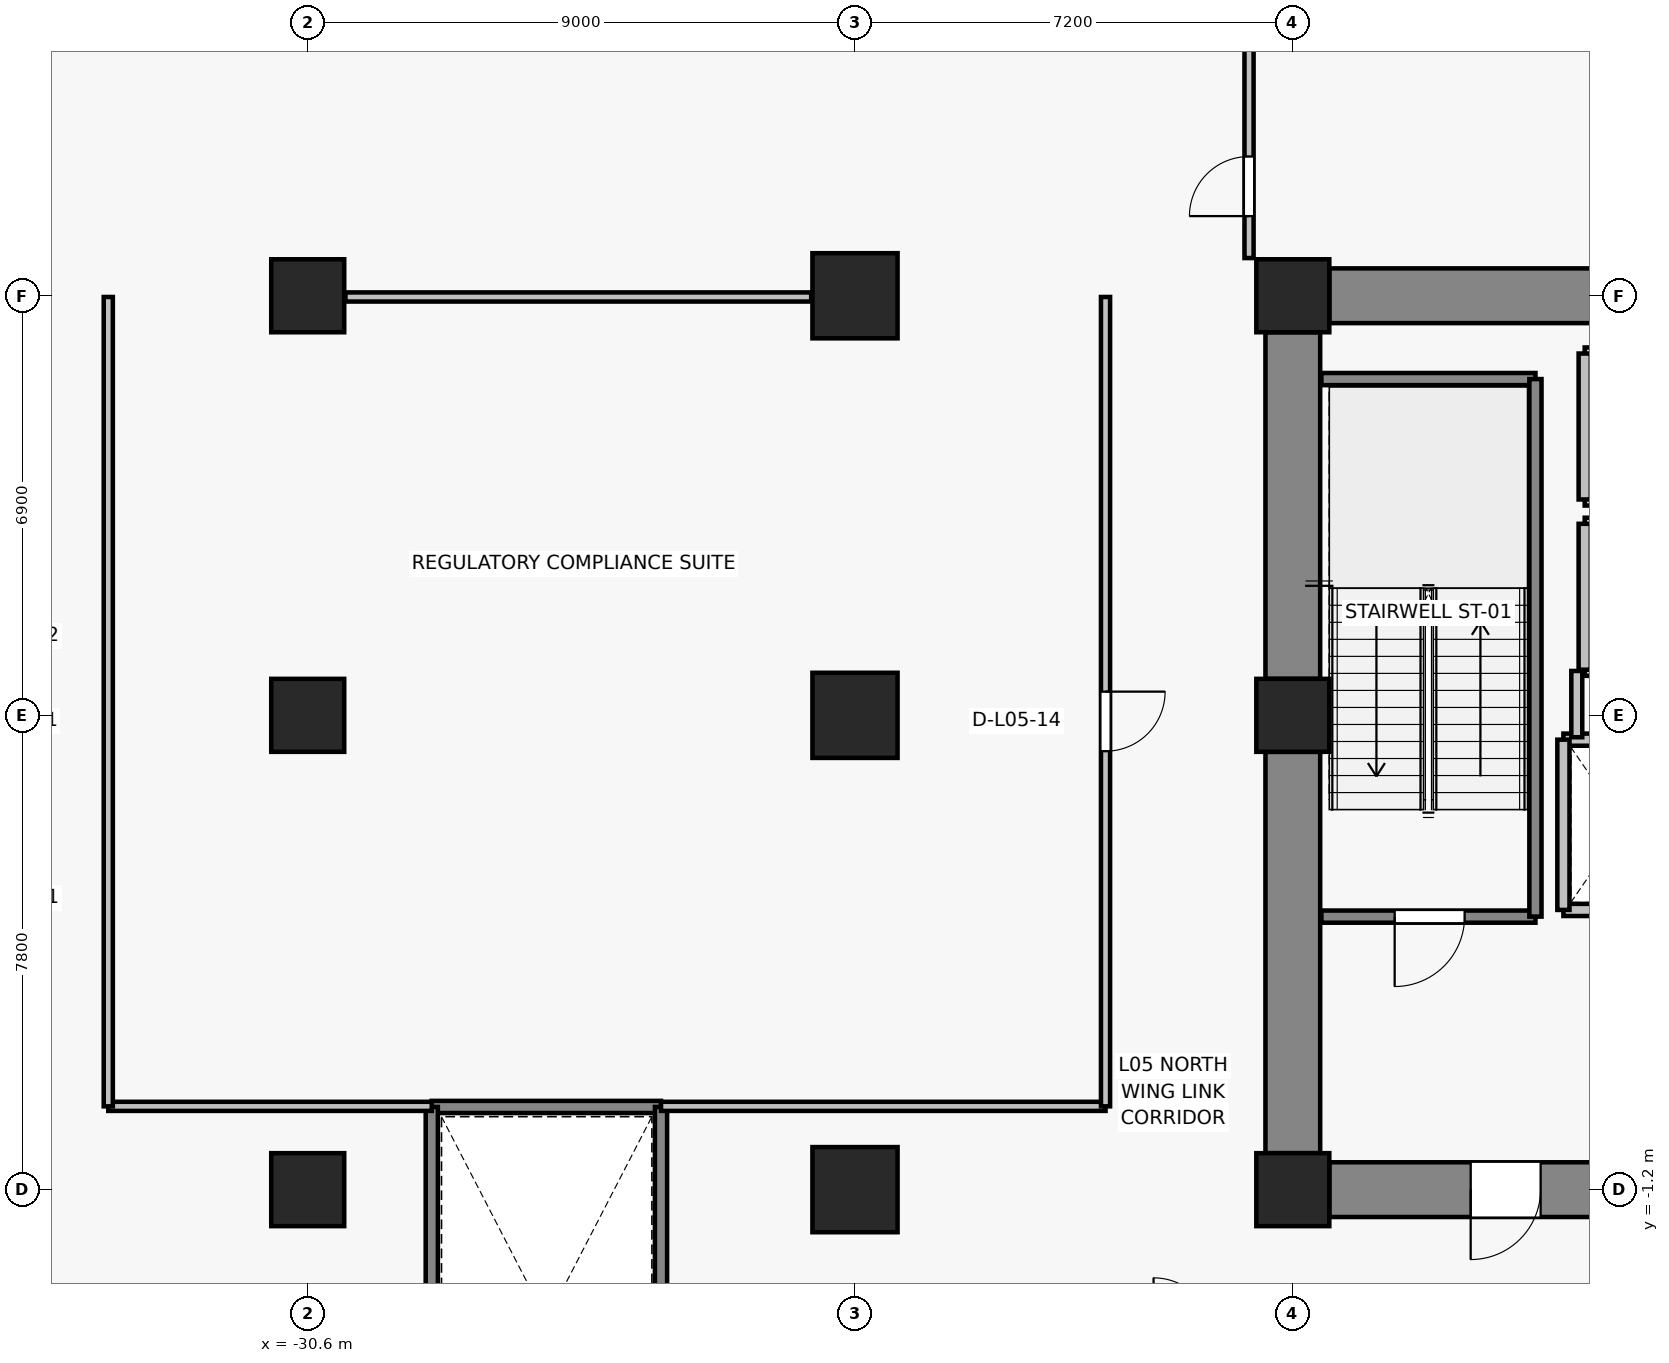
"""IFC4 building model, lengths in metres.
Left out: names, types, materials, properties, quantities, classifications, styles, units other than length and angle.
Written with IfcOpenShell. Run it as: python <this file> out.ifc"""

import sys

from ifc_helpers import new_model, si_unit, direction, frame, frame_2d, origin, origin_2d, place, context, subcontext, project, spatial, rectangle, extrude, source, transform, mapped, element, fill, save


model = new_model("IFC4")
c1 = context("Model", 3, precision=1e-05, world=origin(), true_north=direction((0.0, 1.0)))
c2 = subcontext(c1, "Body", "Model", "MODEL_VIEW")
j1 = project(units=[si_unit("LENGTHUNIT", "METRE"), si_unit("PLANEANGLEUNIT", "RADIAN")], contexts=[c1])
p1 = place(None, origin())
s1 = spatial("IfcSite", under=j1, at=p1, CompositionType="ELEMENT")
p2 = place(p1, origin())
s2 = spatial("IfcBuilding", under=s1, at=p2, CompositionType="ELEMENT")
p3 = place(p2, frame((0.0, 0.0, 22.6)))
s3 = spatial("IfcBuildingStorey", under=s2, at=p3, CompositionType="ELEMENT", Elevation=22.6)
for number, where, z_axis, x_axis in (
    (1, (-14.4, -1.2, 0.0), (0.0, 0.0, 1.0), (1.0, 0.0, 0.0)),
    (2, (-14.4, 6.6, 0.0), (0.0, 0.0, 1.0), (1.0, 0.0, 0.0)),
    (3, (-14.4, 13.5, 0.0), (0.0, 0.0, 1.0), (1.0, 0.0, 0.0)),
):
    element("IfcColumn", number, at=place(p3, frame(where, z_axis=z_axis, x_axis=x_axis)), inside=s3, PredefinedType="COLUMN", context=c2, shape_type="SweptSolid", body=[
        extrude(rectangle(XDim=1.2, YDim=1.2, at=origin_2d()), origin(), (0.0, 0.0, 1.0), 4.8),
    ])
for number, where, z_axis, x_axis in (
    (4, (-21.6, -1.2, 0.0), (0.0, 0.0, 1.0), (1.0, 0.0, 0.0)),
    (5, (-21.6, 6.6, 0.0), (0.0, 0.0, 1.0), (1.0, 0.0, 0.0)),
    (6, (-21.6, 13.5, 0.0), (0.0, 0.0, 1.0), (1.0, 0.0, 0.0)),
):
    element("IfcColumn", number, at=place(p3, frame(where, z_axis=z_axis, x_axis=x_axis)), inside=s3, PredefinedType="COLUMN", context=c2, shape_type="SweptSolid", body=[
        extrude(rectangle(XDim=1.4, YDim=1.4, at=origin_2d()), origin(), (0.0, 0.0, 1.0), 4.8),
    ])
for number, where, z_axis, x_axis in (
    (7, (-30.6, -1.2, 0.0), (0.0, 0.0, 1.0), (1.0, 0.0, 0.0)),
    (8, (-30.6, 6.6, 0.0), (0.0, 0.0, 1.0), (1.0, 0.0, 0.0)),
    (9, (-30.6, 13.5, 0.0), (0.0, 0.0, 1.0), (1.0, 0.0, 0.0)),
):
    element("IfcColumn", number, at=place(p3, frame(where, z_axis=z_axis, x_axis=x_axis)), inside=s3, PredefinedType="COLUMN", context=c2, shape_type="SweptSolid", body=[
        extrude(rectangle(XDim=1.2, YDim=1.2, at=origin_2d()), origin(), (0.0, 0.0, 1.0), 4.8),
    ])
p4 = place(p3, frame((-13.8, 13.5, 0.0), z_axis=(0.0, 0.0, 1.0), x_axis=(1.0, 0.0, 0.0)))
e10 = element("IfcWall", 10, at=p4, inside=s3, PredefinedType="SHEAR", context=c2, shape_type="SweptSolid", body=[
    extrude(rectangle(XDim=6.0, YDim=0.9, at=frame_2d((3.0, 0.0))), origin(), (0.0, 0.0, 1.0), 4.55),
])
p5 = place(p3, frame((-14.4, -0.6, 0.0), z_axis=(0.0, 0.0, 1.0), x_axis=(0.0, 1.0, 0.0)))
e11 = element("IfcWall", 11, at=p5, inside=s3, PredefinedType="SHEAR", context=c2, shape_type="SweptSolid", body=[
    extrude(rectangle(XDim=6.6, YDim=0.9, at=frame_2d((3.3, 0.0))), origin(), (0.0, 0.0, 1.0), 4.55),
])
p6 = place(p3, frame((-14.4, 7.2, 0.0), z_axis=(0.0, 0.0, 1.0), x_axis=(0.0, 1.0, 0.0)))
e12 = element("IfcWall", 12, at=p6, inside=s3, PredefinedType="SHEAR", context=c2, shape_type="SweptSolid", body=[
    extrude(rectangle(XDim=5.7, YDim=0.9, at=frame_2d((2.85, 0.0))), origin(), (0.0, 0.0, 1.0), 4.55),
])
p7 = place(p3, frame((-7.8, -1.2, 0.0), z_axis=(0.0, 0.0, 1.0), x_axis=(-1.0, 0.0, 0.0)))
e13 = element("IfcWall", 13, at=p7, inside=s3, PredefinedType="SHEAR", context=c2, shape_type="SweptSolid", body=[
    extrude(rectangle(XDim=6.0, YDim=0.9, at=frame_2d((3.0, 0.0))), origin(), (0.0, 0.0, 1.0), 4.55),
])
p8 = place(p7, frame((2.525, 0.0, 0.0)))
e14 = element("IfcOpeningElement", 14, at=p8, cuts=e13, PredefinedType="OPENING", context=c2, shape_type="SweptSolid", body=[
    extrude(rectangle(XDim=1.15, YDim=2.15, at=frame_2d((0.575, 1.075))), frame((0.0, 0.46, 0.0), z_axis=(0.0, -1.0, 0.0), x_axis=(1.0, 0.0, 0.0)), (0.0, 0.0, 1.0), 0.92),
])
p9 = place(p3, frame((-7.95, 3.4, 0.0), z_axis=(0.0, 0.0, 1.0), x_axis=(-1.0, 0.0, 0.0)))
e15 = element("IfcWall", 15, at=p9, inside=s3, PredefinedType="SOLIDWALL", context=c2, shape_type="SweptSolid", body=[
    extrude(rectangle(XDim=2.0, YDim=0.2, at=frame_2d((1.0, 0.0))), origin(), (0.0, 0.0, 1.0), 4.55),
])
p10 = place(p9, frame((0.45, 0.0, 0.0)))
e16 = element("IfcOpeningElement", 16, at=p10, cuts=e15, PredefinedType="OPENING", context=c2, shape_type="SweptSolid", body=[
    extrude(rectangle(XDim=1.1, YDim=2.2, at=frame_2d((0.55, 1.1))), frame((0.0, 0.11, 0.0), z_axis=(0.0, -1.0, 0.0), x_axis=(1.0, 0.0, 0.0)), (0.0, 0.0, 1.0), 0.22),
])
p11 = place(p3, frame((-9.95, 6.2, 0.0), z_axis=(0.0, 0.0, 1.0), x_axis=(1.0, 0.0, 0.0)))
e17 = element("IfcWall", 17, at=p11, inside=s3, PredefinedType="SOLIDWALL", context=c2, shape_type="SweptSolid", body=[
    extrude(rectangle(XDim=2.0, YDim=0.2, at=frame_2d((1.0, 0.0))), origin(), (0.0, 0.0, 1.0), 4.55),
])
p12 = place(p3, frame((-9.95, 3.4, 0.0), z_axis=(0.0, 0.0, 1.0), x_axis=(0.0, 1.0, 0.0)))
e18 = element("IfcWall", 18, at=p12, inside=s3, PredefinedType="SOLIDWALL", context=c2, shape_type="SweptSolid", body=[
    extrude(rectangle(XDim=2.8, YDim=0.2, at=frame_2d((1.4, 0.0))), origin(), (0.0, 0.0, 1.0), 4.55),
])
for number, where, z_axis, x_axis in (
    (19, (-7.4, 7.35, 0.0), (0.0, 0.0, 1.0), (-1.0, 0.0, 0.0)),
    (20, (-9.6, 9.75, 0.0), (0.0, 0.0, 1.0), (1.0, 0.0, 0.0)),
):
    element("IfcWall", number, at=place(p3, frame(where, z_axis=z_axis, x_axis=x_axis)), inside=s3, PredefinedType="SOLIDWALL", context=c2, shape_type="SweptSolid", body=[
        extrude(rectangle(XDim=2.2, YDim=0.2, at=frame_2d((1.1, 0.0))), origin(), (0.0, 0.0, 1.0), 3.09),
    ])
p13 = place(p3, frame((-9.6, 7.35, 0.0), z_axis=(0.0, 0.0, 1.0), x_axis=(0.0, 1.0, 0.0)))
e21 = element("IfcWall", 21, at=p13, inside=s3, PredefinedType="SOLIDWALL", context=c2, shape_type="SweptSolid", body=[
    extrude(rectangle(XDim=2.4, YDim=0.2, at=frame_2d((1.2, 0.0))), origin(), (0.0, 0.0, 1.0), 4.55),
])
for number, where, z_axis, x_axis in (
    (22, (-7.4, 10.15, 0.0), (0.0, 0.0, 1.0), (-1.0, 0.0, 0.0)),
    (23, (-9.6, 12.55, 0.0), (0.0, 0.0, 1.0), (1.0, 0.0, 0.0)),
):
    element("IfcWall", number, at=place(p3, frame(where, z_axis=z_axis, x_axis=x_axis)), inside=s3, PredefinedType="SOLIDWALL", context=c2, shape_type="SweptSolid", body=[
        extrude(rectangle(XDim=2.2, YDim=0.2, at=frame_2d((1.1, 0.0))), origin(), (0.0, 0.0, 1.0), 3.09),
    ])
p14 = place(p3, frame((-9.6, 10.15, 0.0), z_axis=(0.0, 0.0, 1.0), x_axis=(0.0, 1.0, 0.0)))
e24 = element("IfcWall", 24, at=p14, inside=s3, PredefinedType="SOLIDWALL", context=c2, shape_type="SweptSolid", body=[
    extrude(rectangle(XDim=2.4, YDim=0.2, at=frame_2d((1.2, 0.0))), origin(), (0.0, 0.0, 1.0), 4.55),
])
p15 = place(p3, frame((-10.41, 3.29, 0.0), z_axis=(0.0, 0.0, 1.0), x_axis=(-1.0, 0.0, 0.0)))
e25 = element("IfcWall", 25, at=p15, inside=s3, PredefinedType="SOLIDWALL", context=c2, shape_type="SweptSolid", body=[
    extrude(rectangle(XDim=3.52, YDim=0.2, at=frame_2d((1.76, 0.0))), origin(), (0.0, 0.0, 1.0), 4.55),
])
p16 = place(p15, frame((1.165, 0.0, 0.0)))
e26 = element("IfcOpeningElement", 26, at=p16, cuts=e25, PredefinedType="OPENING", context=c2, shape_type="SweptSolid", body=[
    extrude(rectangle(XDim=1.15, YDim=2.15, at=frame_2d((0.575, 1.075))), frame((0.0, 0.11, 0.0), z_axis=(0.0, -1.0, 0.0), x_axis=(1.0, 0.0, 0.0)), (0.0, 0.0, 1.0), 0.22),
])
p17 = place(p3, frame((-13.93, 12.13, 0.0), z_axis=(0.0, 0.0, 1.0), x_axis=(1.0, 0.0, 0.0)))
e27 = element("IfcWall", 27, at=p17, inside=s3, PredefinedType="SOLIDWALL", context=c2, shape_type="SweptSolid", body=[
    extrude(rectangle(XDim=3.52, YDim=0.2, at=frame_2d((1.76, 0.0))), origin(), (0.0, 0.0, 1.0), 4.55),
])
p18 = place(p3, frame((-10.41, 12.13, 0.0), z_axis=(0.0, 0.0, 1.0), x_axis=(0.0, -1.0, 0.0)))
e28 = element("IfcWall", 28, at=p18, inside=s3, PredefinedType="SOLIDWALL", context=c2, shape_type="SweptSolid", body=[
    extrude(rectangle(XDim=8.84, YDim=0.2, at=frame_2d((4.42, 0.0))), origin(), (0.0, 0.0, 1.0), 4.55),
])
p19 = place(p3, frame((-9.73, 6.24, 0.0), z_axis=(0.0, 0.0, 1.0), x_axis=(0.0, 1.0, 0.0)))
e29 = element("IfcWall", 29, at=p19, inside=s3, PredefinedType="PARTITIONING", context=c2, shape_type="SweptSolid", body=[
    extrude(rectangle(XDim=1.09, YDim=0.18, at=frame_2d((0.545, 0.0))), origin(), (0.0, 0.0, 1.0), 4.55),
])
p20 = place(p3, frame((-28.56, 0.16, 0.0), z_axis=(0.0, 0.0, 1.0), x_axis=(1.0, 0.0, 0.0)))
e30 = element("IfcWall", 30, at=p20, inside=s3, PredefinedType="SOLIDWALL", context=c2, shape_type="SweptSolid", body=[
    extrude(rectangle(XDim=3.77, YDim=0.2, at=frame_2d((1.885, 0.0))), origin(), (0.0, 0.0, 1.0), 4.55),
])
for number, where, z_axis, x_axis in (
    (31, (-28.56, -8.76, 0.0), (0.0, 0.0, 1.0), (0.0, 1.0, 0.0)),
    (32, (-24.79, 0.16, 0.0), (0.0, 0.0, 1.0), (0.0, -1.0, 0.0)),
):
    element("IfcWall", number, at=place(p3, frame(where, z_axis=z_axis, x_axis=x_axis)), inside=s3, PredefinedType="SOLIDWALL", context=c2, shape_type="SweptSolid", body=[
        extrude(rectangle(XDim=8.92, YDim=0.2, at=frame_2d((4.46, 0.0))), origin(), (0.0, 0.0, 1.0), 3.09),
    ])
p21 = place(p3, frame((-28.56, 0.17, 0.0), z_axis=(0.0, 0.0, 1.0), x_axis=(-1.0, 0.0, 0.0)))
e33 = element("IfcWall", 33, at=p21, inside=s3, PredefinedType="PARTITIONING", context=c2, shape_type="SweptSolid", body=[
    extrude(rectangle(XDim=5.32, YDim=0.15, at=frame_2d((2.66, 0.0))), origin(), (0.0, 0.0, 1.0), 3.09),
])
p22 = place(p3, frame((-17.48, 0.17, 0.0), z_axis=(0.0, 0.0, 1.0), x_axis=(-1.0, 0.0, 0.0)))
e34 = element("IfcWall", 34, at=p22, inside=s3, PredefinedType="PARTITIONING", context=c2, shape_type="SweptSolid", body=[
    extrude(rectangle(XDim=7.31, YDim=0.15, at=frame_2d((3.655, 0.0))), origin(), (0.0, 0.0, 1.0), 3.94),
])
p23 = place(p3, frame((-29.98, 13.48, 0.0), z_axis=(0.0, 0.0, 1.0), x_axis=(1.0, 0.0, 0.0)))
e35 = element("IfcWall", 35, at=p23, inside=s3, PredefinedType="PARTITIONING", context=c2, shape_type="SweptSolid", body=[
    extrude(rectangle(XDim=7.66, YDim=0.15, at=frame_2d((3.83, 0.0))), origin(), (0.0, 0.0, 1.0), 3.09),
])
p24 = place(p3, frame((-33.88, 0.17, 0.0), z_axis=(0.0, 0.0, 1.0), x_axis=(0.0, 1.0, 0.0)))
e36 = element("IfcWall", 36, at=p24, inside=s3, PredefinedType="PARTITIONING", context=c2, shape_type="SweptSolid", body=[
    extrude(rectangle(XDim=13.31, YDim=0.15, at=frame_2d((6.655, 0.0))), origin(), (0.0, 0.0, 1.0), 4.55),
])
p25 = place(p3, frame((-17.48, 13.48, 0.0), z_axis=(0.0, 0.0, 1.0), x_axis=(0.0, -1.0, 0.0)))
e37 = element("IfcWall", 37, at=p25, inside=s3, PredefinedType="PARTITIONING", context=c2, shape_type="SweptSolid", body=[
    extrude(rectangle(XDim=13.31, YDim=0.15, at=frame_2d((6.655, 0.0))), origin(), (0.0, 0.0, 1.0), 3.532),
])
p26 = place(p25, frame((6.49, 0.0, 0.0)))
e38 = element("IfcOpeningElement", 38, at=p26, cuts=e37, PredefinedType="OPENING", context=c2, shape_type="SweptSolid", body=[
    extrude(rectangle(XDim=0.98, YDim=2.15, at=frame_2d((0.49, 1.075))), frame((0.0, 0.085, 0.0), z_axis=(0.0, -1.0, 0.0), x_axis=(1.0, 0.0, 0.0)), (0.0, 0.0, 1.0), 0.17),
])
p27 = place(p3, frame((-15.12, 14.12, 0.0), z_axis=(0.0, 0.0, 1.0), x_axis=(0.0, 1.0, 0.0)))
e39 = element("IfcWall", 39, at=p27, inside=s3, PredefinedType="PARTITIONING", context=c2, shape_type="SweptSolid", body=[
    extrude(rectangle(XDim=6.96, YDim=0.15, at=frame_2d((3.48, 0.0))), origin(), (0.0, 0.0, 1.0), 3.94),
])
p28 = place(p27, frame((0.69, 0.0, 0.0)))
e40 = element("IfcOpeningElement", 40, at=p28, cuts=e39, PredefinedType="OPENING", context=c2, shape_type="SweptSolid", body=[
    extrude(rectangle(XDim=0.98, YDim=2.15, at=frame_2d((0.49, 1.075))), frame((0.0, 0.085, 0.0), z_axis=(0.0, -1.0, 0.0), x_axis=(1.0, 0.0, 0.0)), (0.0, 0.0, 1.0), 0.17),
])
m1 = source(origin(), c2, "Body", "SweptSolid", [
    extrude(rectangle(XDim=1.15, YDim=2.15, at=frame_2d((0.575, 1.075))), frame((0.0, 0.025, 0.0), z_axis=(0.0, -1.0, 0.0), x_axis=(1.0, 0.0, 0.0)), (0.0, 0.0, 1.0), 0.05),
])
p29 = place(p16, origin())
e41 = element("IfcDoor", 41, at=p29, inside=s3, OperationType="SINGLE_SWING_RIGHT", PredefinedType="DOOR", context=c2, shape_type="MappedRepresentation", body=[
    mapped(m1, transform((0.0, 0.0, 0.0), x_axis=(1.0, 0.0, 0.0), y_axis=(0.0, 1.0, 0.0), z_axis=(0.0, 0.0, 1.0), scale=1.0)),
])
fill(e26, e41)
p30 = place(p8, origin())
e42 = element("IfcDoor", 42, at=p30, inside=s3, OperationType="SINGLE_SWING_RIGHT", PredefinedType="DOOR", context=c2, shape_type="MappedRepresentation", body=[
    mapped(m1, transform((0.0, 0.0, 0.0), x_axis=(1.0, 0.0, 0.0), y_axis=(0.0, 1.0, 0.0), z_axis=(0.0, 0.0, 1.0), scale=1.0)),
])
fill(e14, e42)
m2 = source(origin(), c2, "Body", "SweptSolid", [
    extrude(rectangle(XDim=0.98, YDim=2.15, at=frame_2d((0.49, 1.075))), frame((0.0, 0.025, 0.0), z_axis=(0.0, -1.0, 0.0), x_axis=(1.0, 0.0, 0.0)), (0.0, 0.0, 1.0), 0.05),
])
p31 = place(p26, origin())
e43 = element("IfcDoor", 43, at=p31, inside=s3, OperationType="SINGLE_SWING_LEFT", PredefinedType="DOOR", context=c2, shape_type="MappedRepresentation", body=[
    mapped(m2, transform((0.0, 0.0, 0.0), x_axis=(1.0, 0.0, 0.0), y_axis=(0.0, 1.0, 0.0), z_axis=(0.0, 0.0, 1.0), scale=1.0)),
])
fill(e38, e43)
p32 = place(p28, origin())
e44 = element("IfcDoor", 44, at=p32, inside=s3, OperationType="SINGLE_SWING_LEFT", PredefinedType="DOOR", context=c2, shape_type="MappedRepresentation", body=[
    mapped(m2, transform((0.0, 0.0, 0.0), x_axis=(1.0, 0.0, 0.0), y_axis=(0.0, 1.0, 0.0), z_axis=(0.0, 0.0, 1.0), scale=1.0)),
])
fill(e40, e44)
save(model, sys.argv[1])
